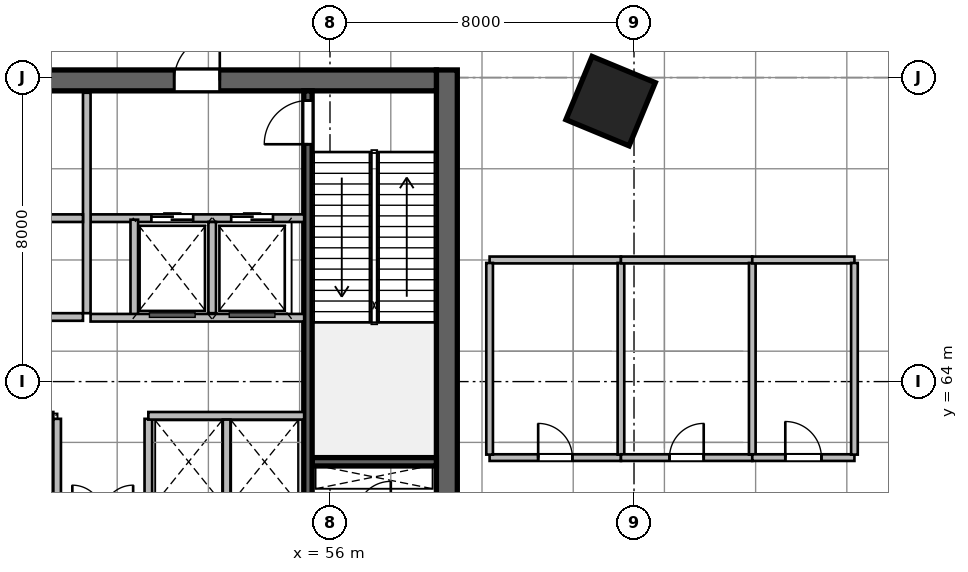
"""IFC4 building model, lengths in metres.
Left out: names, types, materials, properties, quantities, classifications, styles, units other than length and angle.
Written with IfcOpenShell. Run it as: python <this file> out.ifc"""

import sys

from ifc_helpers import new_model, si_unit, direction, frame, frame_2d, origin, origin_2d, place, context, subcontext, project, spatial, rectangle, extrude, source, transform, mapped, element, fill, save


model = new_model("IFC4")
c1 = context("Model", 3, precision=1e-05, world=origin(), true_north=direction((0.0, 1.0)))
c2 = subcontext(c1, "Body", "Model", "MODEL_VIEW")
j1 = project(units=[si_unit("LENGTHUNIT", "METRE"), si_unit("PLANEANGLEUNIT", "RADIAN")], contexts=[c1])
p1 = place(None, origin())
s1 = spatial("IfcSite", under=j1, at=p1, CompositionType="ELEMENT")
p2 = place(p1, origin())
s2 = spatial("IfcBuilding", under=s1, at=p2, CompositionType="ELEMENT")
p3 = place(p2, frame((0.0, 0.0, 6.0)))
s3 = spatial("IfcBuildingStorey", under=s2, at=p3, CompositionType="ELEMENT", Elevation=6.0)
m1 = source(origin(), c2, "Body", "SweptSolid", [
    extrude(rectangle(XDim=12.0, YDim=0.55, at=frame_2d((6.0, 0.0))), origin(), (0.0, 0.0, 1.0), 6.0),
])
p4 = place(p3, frame((59.075, 60.2, 0.0), z_axis=(0.0, 0.0, 1.0), x_axis=(0.0, 1.0, 0.0)))
e1 = element("IfcWall", 1, at=p4, inside=s3, PredefinedType="SHEAR", context=c2, shape_type="MappedRepresentation", body=[
    mapped(m1, transform((0.0, 0.0, 0.0), scale=1.0)),
])
m2 = source(origin(), c2, "Body", "SweptSolid", [
    extrude(rectangle(XDim=21.6, YDim=0.55, at=frame_2d((10.8, 0.0))), origin(), (0.0, 0.0, 1.0), 6.0),
])
p5 = place(p3, frame((37.2, 71.925, 0.0), z_axis=(0.0, 0.0, 1.0), x_axis=(1.0, 0.0, 0.0)))
e2 = element("IfcWall", 2, at=p5, inside=s3, PredefinedType="SHEAR", context=c2, shape_type="MappedRepresentation", body=[
    mapped(m2, transform((0.0, 0.0, 0.0), scale=1.0)),
])
p6 = place(p5, frame((1.2, 0.0, 0.0)))
e3 = element("IfcOpeningElement", 3, at=p6, cuts=e2, PredefinedType="OPENING", context=c2, shape_type="SweptSolid", body=[
    extrude(rectangle(XDim=0.9, YDim=2.1, at=frame_2d((0.45, 1.05))), frame((0.0, 0.285, 0.0), z_axis=(0.0, -1.0, 0.0), x_axis=(1.0, 0.0, 0.0)), (0.0, 0.0, 1.0), 0.57),
])
p7 = place(p5, frame((14.7, 0.0, 0.0)))
e4 = element("IfcOpeningElement", 4, at=p7, cuts=e2, PredefinedType="OPENING", context=c2, shape_type="SweptSolid", body=[
    extrude(rectangle(XDim=1.2, YDim=2.15, at=frame_2d((0.6, 1.075))), frame((0.0, 0.285, 0.0), z_axis=(0.0, -1.0, 0.0), x_axis=(1.0, 0.0, 0.0)), (0.0, 0.0, 1.0), 0.57),
])
p8 = place(p5, frame((4.15, 0.0, 0.0)))
e5 = element("IfcOpeningElement", 5, at=p8, cuts=e2, PredefinedType="OPENING", context=c2, shape_type="SweptSolid", body=[
    extrude(rectangle(XDim=1.3, YDim=2.15, at=frame_2d((0.65, 1.075))), frame((0.0, 0.285, 0.0), z_axis=(0.0, -1.0, 0.0), x_axis=(1.0, 0.0, 0.0)), (0.0, 0.0, 1.0), 0.57),
])
p9 = place(p5, frame((7.1, 0.0, 0.0)))
e6 = element("IfcOpeningElement", 6, at=p9, cuts=e2, PredefinedType="OPENING", context=c2, shape_type="SweptSolid", body=[
    extrude(rectangle(XDim=0.9, YDim=2.1, at=frame_2d((0.45, 1.05))), frame((0.0, 0.285, 0.0), z_axis=(0.0, -1.0, 0.0), x_axis=(1.0, 0.0, 0.0)), (0.0, 0.0, 1.0), 0.57),
])
m3 = source(origin(), c2, "Body", "SweptSolid", [
    extrude(rectangle(XDim=3.27, YDim=0.22, at=frame_2d((1.635, 0.0))), origin(), (0.0, 0.0, 1.0), 6.0),
])
p10 = place(p3, frame((55.53, 61.89, 0.0), z_axis=(0.0, 0.0, 1.0), x_axis=(1.0, 0.0, 0.0)))
e7 = element("IfcWall", 7, at=p10, inside=s3, PredefinedType="SHEAR", context=c2, shape_type="MappedRepresentation", body=[
    mapped(m3, transform((0.0, 0.0, 0.0), scale=1.0)),
])
m4 = source(origin(), c2, "Body", "SweptSolid", [
    extrude(rectangle(XDim=10.9, YDim=0.22, at=frame_2d((5.45, 0.0))), origin(), (0.0, 0.0, 1.0), 6.0),
])
p11 = place(p3, frame((55.42, 60.75, 0.0), z_axis=(0.0, 0.0, 1.0), x_axis=(0.0, 1.0, 0.0)))
e8 = element("IfcWall", 8, at=p11, inside=s3, PredefinedType="SHEAR", context=c2, shape_type="MappedRepresentation", body=[
    mapped(m4, transform((0.0, 0.0, 0.0), scale=1.0)),
])
p12 = place(p11, frame((9.495, 0.0, 0.0)))
e9 = element("IfcOpeningElement", 9, at=p12, cuts=e8, PredefinedType="OPENING", context=c2, shape_type="SweptSolid", body=[
    extrude(rectangle(XDim=1.15, YDim=2.15, at=frame_2d((0.575, 1.075))), frame((0.0, 0.12, 0.0), z_axis=(0.0, -1.0, 0.0), x_axis=(1.0, 0.0, 0.0)), (0.0, 0.0, 1.0), 0.24),
])
m5 = source(origin(), c2, "Body", "SweptSolid", [
    extrude(rectangle(XDim=1.8, YDim=1.8, at=origin_2d()), origin(), (0.0, 0.0, 1.0), 6.0),
])
p13 = place(p3, frame((63.384, 71.379, 0.0), z_axis=(0.0, 0.0, 1.0), x_axis=(0.382683432365, 0.923879532511, 0.0)))
e10 = element("IfcColumn", 10, at=p13, inside=s3, PredefinedType="COLUMN", context=c2, shape_type="MappedRepresentation", body=[
    mapped(m5, transform((0.0, 0.0, 0.0), scale=1.0)),
])
m6 = source(origin(), c2, "Body", "SweptSolid", [
    extrude(rectangle(XDim=5.667, YDim=0.35, at=frame_2d((2.833, 0.0))), origin(), (0.0, 0.0, 1.0), 5.7),
])
p14 = place(p3, frame((75.698, 72.147, 0.0), z_axis=(0.0, 0.0, 1.0), x_axis=(-0.873233089296, 0.487302751642, 0.0)))
e11 = element("IfcWall", 11, at=p14, inside=s3, PredefinedType="SOLIDWALL", context=c2, shape_type="MappedRepresentation", body=[
    mapped(m6, transform((0.0, 0.0, 0.0), scale=1.0)),
])
m7 = source(origin(), c2, "Body", "SweptSolid", [
    extrude(rectangle(XDim=2.24, YDim=0.2, at=frame_2d((1.12, 0.0))), origin(), (0.0, 0.0, 1.0), 5.7),
])
for number, where, z_axis, x_axis in (
    (12, (48.82, 60.78, 0.0), (0.0, 0.0, 1.0), (0.0, 1.0, 0.0)),
    (13, (51.22, 60.78, 0.0), (0.0, 0.0, 1.0), (0.0, 1.0, 0.0)),
):
    element("IfcWall", number, at=place(p3, frame(where, z_axis=z_axis, x_axis=x_axis)), inside=s3, PredefinedType="SOLIDWALL", context=c2, shape_type="MappedRepresentation", body=[
        mapped(m7, transform((0.0, 0.0, 0.0), scale=1.0)),
    ])
m8 = source(origin(), c2, "Body", "SweptSolid", [
    extrude(rectangle(XDim=5.62, YDim=0.2, at=frame_2d((2.81, 0.0))), origin(), (0.0, 0.0, 1.0), 5.7),
])
p15 = place(p3, frame((49.7, 68.3, 0.0), z_axis=(0.0, 0.0, 1.0), x_axis=(1.0, 0.0, 0.0)))
e14 = element("IfcWall", 14, at=p15, inside=s3, PredefinedType="SOLIDWALL", context=c2, shape_type="MappedRepresentation", body=[
    mapped(m8, transform((0.0, 0.0, 0.0), scale=1.0)),
])
p16 = place(p15, frame((1.6, 0.0, 0.0)))
e15 = element("IfcOpeningElement", 15, at=p16, cuts=e14, PredefinedType="OPENING", context=c2, shape_type="SweptSolid", body=[
    extrude(rectangle(XDim=1.1, YDim=2.15, at=frame_2d((0.55, 1.075))), frame((0.0, 0.11, 0.0), z_axis=(0.0, -1.0, 0.0), x_axis=(1.0, 0.0, 0.0)), (0.0, 0.0, 1.0), 0.22),
])
p17 = place(p15, frame((3.7, 0.0, 0.0)))
e16 = element("IfcOpeningElement", 16, at=p17, cuts=e14, PredefinedType="OPENING", context=c2, shape_type="SweptSolid", body=[
    extrude(rectangle(XDim=1.1, YDim=2.15, at=frame_2d((0.55, 1.075))), frame((0.0, 0.11, 0.0), z_axis=(0.0, -1.0, 0.0), x_axis=(1.0, 0.0, 0.0)), (0.0, 0.0, 1.0), 0.22),
])
m9 = source(origin(), c2, "Body", "SweptSolid", [
    extrude(rectangle(XDim=5.8, YDim=0.2, at=frame_2d((2.9, 0.0))), origin(), (0.0, 0.0, 1.0), 5.7),
])
p18 = place(p3, frame((49.6, 65.8, 0.0), z_axis=(0.0, 0.0, 1.0), x_axis=(0.0, 1.0, 0.0)))
e17 = element("IfcWall", 17, at=p18, inside=s3, PredefinedType="SOLIDWALL", context=c2, shape_type="MappedRepresentation", body=[
    mapped(m9, transform((0.0, 0.0, 0.0), scale=1.0)),
])
m10 = source(origin(), c2, "Body", "SweptSolid", [
    extrude(rectangle(XDim=2.58, YDim=0.2, at=frame_2d((1.29, 0.0))), origin(), (0.0, 0.0, 1.0), 5.7),
])
p19 = place(p3, frame((50.85, 65.68, 0.0), z_axis=(0.0, 0.0, 1.0), x_axis=(0.0, 1.0, 0.0)))
e18 = element("IfcWall", 18, at=p19, inside=s3, PredefinedType="SOLIDWALL", context=c2, shape_type="MappedRepresentation", body=[
    mapped(m10, transform((0.0, 0.0, 0.0), scale=1.0)),
])
m11 = source(origin(), c2, "Body", "SweptSolid", [
    extrude(rectangle(XDim=2.4, YDim=0.2, at=frame_2d((1.2, 0.0))), origin(), (0.0, 0.0, 1.0), 5.7),
])
p20 = place(p3, frame((52.9, 65.8, 0.0), z_axis=(0.0, 0.0, 1.0), x_axis=(0.0, 1.0, 0.0)))
e19 = element("IfcWall", 19, at=p20, inside=s3, PredefinedType="SOLIDWALL", context=c2, shape_type="MappedRepresentation", body=[
    mapped(m11, transform((0.0, 0.0, 0.0), scale=1.0)),
])
p21 = place(p3, frame((49.7, 65.68, 0.0), z_axis=(0.0, 0.0, 1.0), x_axis=(1.0, 0.0, 0.0)))
e20 = element("IfcWall", 20, at=p21, inside=s3, PredefinedType="SOLIDWALL", context=c2, shape_type="MappedRepresentation", body=[
    mapped(m8, transform((0.0, 0.0, 0.0), scale=1.0)),
])
m12 = source(origin(), c2, "Body", "SweptSolid", [
    extrude(rectangle(XDim=8.8, YDim=0.2, at=frame_2d((4.4, 0.0))), origin(), (0.0, 0.0, 1.0), 5.7),
])
p22 = place(p3, frame((40.7, 68.3, 0.0), z_axis=(0.0, 0.0, 1.0), x_axis=(1.0, 0.0, 0.0)))
e21 = element("IfcWall", 21, at=p22, inside=s3, PredefinedType="SOLIDWALL", context=c2, shape_type="MappedRepresentation", body=[
    mapped(m12, transform((0.0, 0.0, 0.0), scale=1.0)),
])
m13 = source(origin(), c2, "Body", "SweptSolid", [
    extrude(rectangle(XDim=8.02, YDim=0.2, at=frame_2d((4.01, 0.0))), origin(), (0.0, 0.0, 1.0), 5.7),
])
p23 = place(p3, frame((40.7, 63.1, 0.0), z_axis=(0.0, 0.0, 1.0), x_axis=(1.0, 0.0, 0.0)))
e22 = element("IfcWall", 22, at=p23, inside=s3, PredefinedType="SOLIDWALL", context=c2, shape_type="MappedRepresentation", body=[
    mapped(m13, transform((0.0, 0.0, 0.0), scale=1.0)),
])
p24 = place(p23, frame((0.72, 0.0, 0.0)))
e23 = element("IfcOpeningElement", 23, at=p24, cuts=e22, PredefinedType="OPENING", context=c2, shape_type="SweptSolid", body=[
    extrude(rectangle(XDim=1.0, YDim=2.15, at=frame_2d((0.5, 1.075))), frame((0.0, 0.11, 0.0), z_axis=(0.0, -1.0, 0.0), x_axis=(1.0, 0.0, 0.0)), (0.0, 0.0, 1.0), 0.22),
])
p25 = place(p23, frame((2.62, 0.0, 0.0)))
e24 = element("IfcOpeningElement", 24, at=p25, cuts=e22, PredefinedType="OPENING", context=c2, shape_type="SweptSolid", body=[
    extrude(rectangle(XDim=1.0, YDim=2.15, at=frame_2d((0.5, 1.075))), frame((0.0, 0.11, 0.0), z_axis=(0.0, -1.0, 0.0), x_axis=(1.0, 0.0, 0.0)), (0.0, 0.0, 1.0), 0.22),
])
p26 = place(p23, frame((4.55, 0.0, 0.0)))
e25 = element("IfcOpeningElement", 25, at=p26, cuts=e22, PredefinedType="OPENING", context=c2, shape_type="SweptSolid", body=[
    extrude(rectangle(XDim=1.0, YDim=2.15, at=frame_2d((0.5, 1.075))), frame((0.0, 0.11, 0.0), z_axis=(0.0, -1.0, 0.0), x_axis=(1.0, 0.0, 0.0)), (0.0, 0.0, 1.0), 0.22),
])
p27 = place(p23, frame((6.55, 0.0, 0.0)))
e26 = element("IfcOpeningElement", 26, at=p27, cuts=e22, PredefinedType="OPENING", context=c2, shape_type="SweptSolid", body=[
    extrude(rectangle(XDim=1.0, YDim=2.15, at=frame_2d((0.5, 1.075))), frame((0.0, 0.11, 0.0), z_axis=(0.0, -1.0, 0.0), x_axis=(1.0, 0.0, 0.0)), (0.0, 0.0, 1.0), 0.22),
])
m14 = source(origin(), c2, "Body", "SweptSolid", [
    extrude(rectangle(XDim=4.1, YDim=0.2, at=frame_2d((2.05, 0.0))), origin(), (0.0, 0.0, 1.0), 5.7),
])
p28 = place(p3, frame((51.22, 63.1, 0.0), z_axis=(0.0, 0.0, 1.0), x_axis=(1.0, 0.0, 0.0)))
e27 = element("IfcWall", 27, at=p28, inside=s3, PredefinedType="SOLIDWALL", context=c2, shape_type="MappedRepresentation", body=[
    mapped(m14, transform((0.0, 0.0, 0.0), scale=1.0)),
])
m15 = source(origin(), c2, "Body", "SweptSolid", [
    extrude(rectangle(XDim=2.2, YDim=0.2, at=frame_2d((1.1, 0.0))), origin(), (0.0, 0.0, 1.0), 5.7),
])
p29 = place(p3, frame((53.28, 60.8, 0.0), z_axis=(0.0, 0.0, 1.0), x_axis=(0.0, 1.0, 0.0)))
e28 = element("IfcWall", 28, at=p29, inside=s3, PredefinedType="SOLIDWALL", context=c2, shape_type="MappedRepresentation", body=[
    mapped(m15, transform((0.0, 0.0, 0.0), scale=1.0)),
])
p30 = place(p3, frame((40.7, 65.7, 0.0), z_axis=(0.0, 0.0, 1.0), x_axis=(1.0, 0.0, 0.0)))
e29 = element("IfcWall", 29, at=p30, inside=s3, PredefinedType="SOLIDWALL", context=c2, shape_type="MappedRepresentation", body=[
    mapped(m12, transform((0.0, 0.0, 0.0), scale=1.0)),
])
p31 = place(p30, frame((3.8, 0.0, 0.0)))
e30 = element("IfcOpeningElement", 30, at=p31, cuts=e29, PredefinedType="OPENING", context=c2, shape_type="SweptSolid", body=[
    extrude(rectangle(XDim=0.95, YDim=2.15, at=frame_2d((0.475, 1.075))), frame((0.0, 0.11, 0.0), z_axis=(0.0, -1.0, 0.0), x_axis=(1.0, 0.0, 0.0)), (0.0, 0.0, 1.0), 0.22),
])
m16 = source(origin(), c2, "Body", "SweptSolid", [
    extrude(rectangle(XDim=3.456, YDim=0.175, at=frame_2d((1.728, 0.0))), origin(), (0.0, 0.0, 1.0), 5.7),
])
p32 = place(p3, frame((60.2, 62.0, 0.0), z_axis=(0.0, 0.0, 1.0), x_axis=(1.0, 0.0, 0.0)))
e31 = element("IfcWall", 31, at=p32, inside=s3, PredefinedType="PARTITIONING", context=c2, shape_type="MappedRepresentation", body=[
    mapped(m16, transform((0.0, 0.0, 0.0), scale=1.0)),
])
p33 = place(p32, frame((1.278, 0.0, 0.0)))
e32 = element("IfcOpeningElement", 32, at=p33, cuts=e31, PredefinedType="OPENING", context=c2, shape_type="SweptSolid", body=[
    extrude(rectangle(XDim=0.9, YDim=2.08, at=frame_2d((0.45, 1.04))), frame((0.0, 0.098, 0.0), z_axis=(0.0, -1.0, 0.0), x_axis=(1.0, 0.0, 0.0)), (0.0, 0.0, 1.0), 0.195),
])
m17 = source(origin(), c2, "Body", "SweptSolid", [
    extrude(rectangle(XDim=3.456, YDim=0.18, at=frame_2d((1.728, 0.0))), origin(), (0.0, 0.0, 1.0), 5.7),
])
p34 = place(p3, frame((60.2, 67.2, 0.0), z_axis=(0.0, 0.0, 1.0), x_axis=(1.0, 0.0, 0.0)))
e33 = element("IfcWall", 33, at=p34, inside=s3, PredefinedType="PLUMBINGWALL", context=c2, shape_type="MappedRepresentation", body=[
    mapped(m17, transform((0.0, 0.0, 0.0), scale=1.0)),
])
m18 = source(origin(), c2, "Body", "SweptSolid", [
    extrude(rectangle(XDim=5.043, YDim=0.175, at=frame_2d((2.521, 0.0))), origin(), (0.0, 0.0, 1.0), 5.7),
])
for number, where, z_axis, x_axis in (
    (34, (60.2, 62.079, 0.0), (0.0, 0.0, 1.0), (0.0, 1.0, 0.0)),
    (35, (63.656, 62.079, 0.0), (0.0, 0.0, 1.0), (0.0, 1.0, 0.0)),
):
    element("IfcWall", number, at=place(p3, frame(where, z_axis=z_axis, x_axis=x_axis)), inside=s3, PredefinedType="PARTITIONING", context=c2, shape_type="MappedRepresentation", body=[
        mapped(m18, transform((0.0, 0.0, 0.0), scale=1.0)),
    ])
p35 = place(p3, frame((63.656, 62.0, 0.0), z_axis=(0.0, 0.0, 1.0), x_axis=(1.0, 0.0, 0.0)))
e36 = element("IfcWall", 36, at=p35, inside=s3, PredefinedType="PARTITIONING", context=c2, shape_type="MappedRepresentation", body=[
    mapped(m16, transform((0.0, 0.0, 0.0), scale=1.0)),
])
p36 = place(p35, frame((1.278, 0.0, 0.0)))
e37 = element("IfcOpeningElement", 37, at=p36, cuts=e36, PredefinedType="OPENING", context=c2, shape_type="SweptSolid", body=[
    extrude(rectangle(XDim=0.9, YDim=2.08, at=frame_2d((0.45, 1.04))), frame((0.0, 0.098, 0.0), z_axis=(0.0, -1.0, 0.0), x_axis=(1.0, 0.0, 0.0)), (0.0, 0.0, 1.0), 0.195),
])
p37 = place(p3, frame((63.656, 67.2, 0.0), z_axis=(0.0, 0.0, 1.0), x_axis=(1.0, 0.0, 0.0)))
e38 = element("IfcWall", 38, at=p37, inside=s3, PredefinedType="PLUMBINGWALL", context=c2, shape_type="MappedRepresentation", body=[
    mapped(m17, transform((0.0, 0.0, 0.0), scale=1.0)),
])
p38 = place(p3, frame((67.112, 62.079, 0.0), z_axis=(0.0, 0.0, 1.0), x_axis=(0.0, 1.0, 0.0)))
e39 = element("IfcWall", 39, at=p38, inside=s3, PredefinedType="PARTITIONING", context=c2, shape_type="MappedRepresentation", body=[
    mapped(m18, transform((0.0, 0.0, 0.0), scale=1.0)),
])
m19 = source(origin(), c2, "Body", "SweptSolid", [
    extrude(rectangle(XDim=2.688, YDim=0.175, at=frame_2d((1.344, 0.0))), origin(), (0.0, 0.0, 1.0), 5.7),
])
p39 = place(p3, frame((67.112, 62.0, 0.0), z_axis=(0.0, 0.0, 1.0), x_axis=(1.0, 0.0, 0.0)))
e40 = element("IfcWall", 40, at=p39, inside=s3, PredefinedType="PARTITIONING", context=c2, shape_type="MappedRepresentation", body=[
    mapped(m19, transform((0.0, 0.0, 0.0), scale=1.0)),
])
p40 = place(p39, frame((0.869, 0.0, 0.0)))
e41 = element("IfcOpeningElement", 41, at=p40, cuts=e40, PredefinedType="OPENING", context=c2, shape_type="SweptSolid", body=[
    extrude(rectangle(XDim=0.95, YDim=2.12, at=frame_2d((0.475, 1.06))), frame((0.0, 0.098, 0.0), z_axis=(0.0, -1.0, 0.0), x_axis=(1.0, 0.0, 0.0)), (0.0, 0.0, 1.0), 0.195),
])
m20 = source(origin(), c2, "Body", "SweptSolid", [
    extrude(rectangle(XDim=2.688, YDim=0.18, at=frame_2d((1.344, 0.0))), origin(), (0.0, 0.0, 1.0), 5.7),
])
p41 = place(p3, frame((67.112, 67.2, 0.0), z_axis=(0.0, 0.0, 1.0), x_axis=(1.0, 0.0, 0.0)))
e42 = element("IfcWall", 42, at=p41, inside=s3, PredefinedType="PLUMBINGWALL", context=c2, shape_type="MappedRepresentation", body=[
    mapped(m20, transform((0.0, 0.0, 0.0), scale=1.0)),
])
p42 = place(p3, frame((69.8, 62.079, 0.0), z_axis=(0.0, 0.0, 1.0), x_axis=(0.0, 1.0, 0.0)))
e43 = element("IfcWall", 43, at=p42, inside=s3, PredefinedType="PARTITIONING", context=c2, shape_type="MappedRepresentation", body=[
    mapped(m18, transform((0.0, 0.0, 0.0), scale=1.0)),
])
m21 = source(origin(), c2, "Body", "SweptSolid", [
    extrude(rectangle(XDim=1.15, YDim=2.15, at=frame_2d((0.575, 1.075))), frame((0.0, 0.025, 0.0), z_axis=(0.0, -1.0, 0.0), x_axis=(1.0, 0.0, 0.0)), (0.0, 0.0, 1.0), 0.05),
])
p43 = place(p12, origin())
e44 = element("IfcDoor", 44, at=p43, inside=s3, OperationType="SINGLE_SWING_LEFT", PredefinedType="DOOR", context=c2, shape_type="MappedRepresentation", body=[
    mapped(m21, transform((0.0, 0.0, 0.0), scale=1.0)),
])
fill(e9, e44)
m22 = source(origin(), c2, "Body", "SweptSolid", [
    extrude(rectangle(XDim=1.2, YDim=2.15, at=frame_2d((0.6, 1.075))), frame((0.0, 0.025, 0.0), z_axis=(0.0, -1.0, 0.0), x_axis=(1.0, 0.0, 0.0)), (0.0, 0.0, 1.0), 0.05),
])
p44 = place(p7, origin())
e45 = element("IfcDoor", 45, at=p44, inside=s3, OperationType="SINGLE_SWING_RIGHT", PredefinedType="DOOR", context=c2, shape_type="MappedRepresentation", body=[
    mapped(m22, transform((0.0, 0.0, 0.0), scale=1.0)),
])
fill(e4, e45)
m23 = source(origin(), c2, "Body", "SweptSolid", [
    extrude(rectangle(XDim=1.1, YDim=2.15, at=frame_2d((0.55, 1.075))), frame((0.0, 0.025, 0.0), z_axis=(0.0, -1.0, 0.0), x_axis=(1.0, 0.0, 0.0)), (0.0, 0.0, 1.0), 0.05),
])
p45 = place(p16, origin())
e46 = element("IfcDoor", 46, at=p45, inside=s3, OperationType="DOUBLE_DOOR_SLIDING", PredefinedType="DOOR", context=c2, shape_type="MappedRepresentation", body=[
    mapped(m23, transform((0.0, 0.0, 0.0), scale=1.0)),
])
fill(e15, e46)
p46 = place(p17, origin())
e47 = element("IfcDoor", 47, at=p46, inside=s3, OperationType="DOUBLE_DOOR_SLIDING", PredefinedType="DOOR", context=c2, shape_type="MappedRepresentation", body=[
    mapped(m23, transform((0.0, 0.0, 0.0), scale=1.0)),
])
fill(e16, e47)
m24 = source(origin(), c2, "Body", "SweptSolid", [
    extrude(rectangle(XDim=0.9, YDim=2.08, at=frame_2d((0.45, 1.04))), frame((0.0, 0.025, 0.0), z_axis=(0.0, -1.0, 0.0), x_axis=(1.0, 0.0, 0.0)), (0.0, 0.0, 1.0), 0.05),
])
p47 = place(p33, origin())
e48 = element("IfcDoor", 48, at=p47, inside=s3, OperationType="SINGLE_SWING_LEFT", PredefinedType="DOOR", context=c2, shape_type="MappedRepresentation", body=[
    mapped(m24, transform((0.0, 0.0, 0.0), scale=1.0)),
])
fill(e32, e48)
p48 = place(p36, origin())
e49 = element("IfcDoor", 49, at=p48, inside=s3, OperationType="SINGLE_SWING_RIGHT", PredefinedType="DOOR", context=c2, shape_type="MappedRepresentation", body=[
    mapped(m24, transform((0.0, 0.0, 0.0), scale=1.0)),
])
fill(e37, e49)
m25 = source(origin(), c2, "Body", "SweptSolid", [
    extrude(rectangle(XDim=0.95, YDim=2.12, at=frame_2d((0.475, 1.06))), frame((0.0, 0.025, 0.0), z_axis=(0.0, -1.0, 0.0), x_axis=(1.0, 0.0, 0.0)), (0.0, 0.0, 1.0), 0.05),
])
p49 = place(p40, origin())
e50 = element("IfcDoor", 50, at=p49, inside=s3, OperationType="SINGLE_SWING_LEFT", PredefinedType="DOOR", context=c2, shape_type="MappedRepresentation", body=[
    mapped(m25, transform((0.0, 0.0, 0.0), scale=1.0)),
])
fill(e41, e50)
save(model, sys.argv[1])
